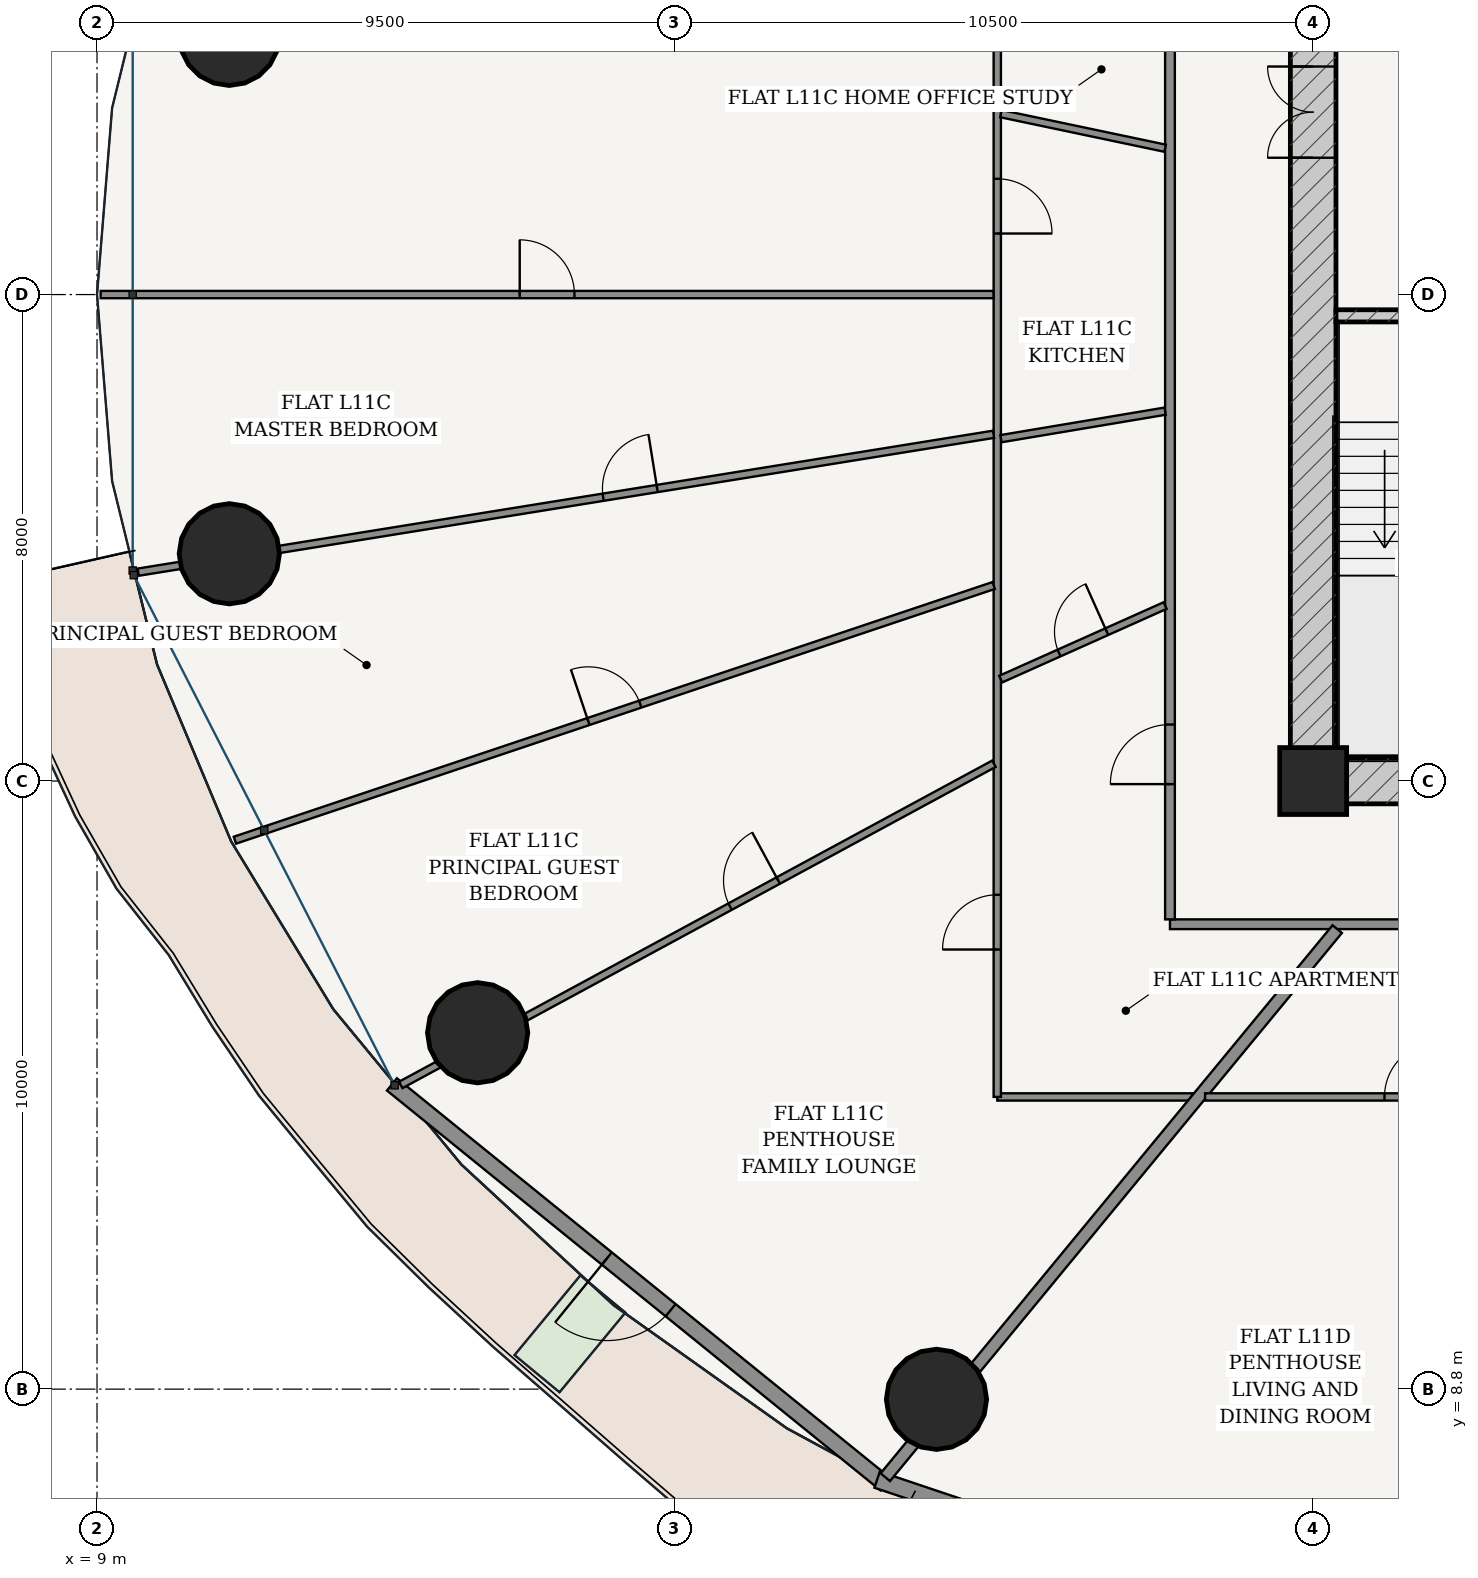
"""IFC4 building model, lengths in metres.
Left out: names, types, materials, properties, quantities, classifications, styles, units other than length and angle.
Written with IfcOpenShell. Run it as: python <this file> out.ifc"""

import sys

from ifc_helpers import new_model, si_unit, direction, frame, frame_2d, origin, origin_2d, place, context, subcontext, project, spatial, rectangle, hollow_circle, extrude, source, transform, mapped, element, fill, save


model = new_model("IFC4")
c1 = context("Model", 3, precision=1e-05, world=origin(), true_north=direction((-0.2419218956, 0.970295726276)))
c2 = subcontext(c1, "Body", "Model", "MODEL_VIEW")
j1 = project(units=[si_unit("LENGTHUNIT", "METRE"), si_unit("PLANEANGLEUNIT", "RADIAN")], contexts=[c1])
p1 = place(None, origin())
s1 = spatial("IfcSite", under=j1, at=p1, CompositionType="ELEMENT")
p2 = place(p1, origin())
s2 = spatial("IfcBuilding", under=s1, at=p2, CompositionType="ELEMENT")
p3 = place(p2, frame((0.0, 0.0, 45.6)))
s3 = spatial("IfcBuildingStorey", under=s2, at=p3, CompositionType="ELEMENT", Elevation=45.6)
p4 = place(p3, frame((29.0, 18.8, 0.0), z_axis=(0.0, 0.0, 1.0), x_axis=(1.0, 0.0, 0.0)))
e1 = element("IfcColumn", 1, at=p4, inside=s3, PredefinedType="COLUMN", context=c2, shape_type="SweptSolid", body=[
    extrude(rectangle(XDim=1.1, YDim=1.1, at=origin_2d()), origin(), (0.0, 0.0, 1.0), 3.6),
])
p5 = place(p3, frame((28.625, 18.8, 0.0), z_axis=(0.0, 0.0, 1.0), x_axis=(1.0, 0.0, 0.0)))
e2 = element("IfcWall", 2, at=p5, inside=s3, PredefinedType="SHEAR", context=c2, shape_type="SweptSolid", body=[
    extrude(rectangle(XDim=18.75, YDim=0.75, at=frame_2d((9.375, 0.0))), origin(), (0.0, 0.0, 1.0), 3.32),
])
p6 = place(p5, frame((7.627, 0.0, 0.0)))
e3 = element("IfcOpeningElement", 3, at=p6, cuts=e2, PredefinedType="OPENING", context=c2, shape_type="SweptSolid", body=[
    extrude(rectangle(XDim=0.85, YDim=2.1, at=frame_2d((0.425, 1.05))), frame((0.0, 0.385, 0.0), z_axis=(0.0, -1.0, 0.0), x_axis=(1.0, 0.0, 0.0)), (0.0, 0.0, 1.0), 0.77),
])
p7 = place(p5, frame((10.673, 0.0, 0.0)))
e4 = element("IfcOpeningElement", 4, at=p7, cuts=e2, PredefinedType="OPENING", context=c2, shape_type="SweptSolid", body=[
    extrude(rectangle(XDim=0.85, YDim=2.1, at=frame_2d((0.425, 1.05))), frame((0.0, 0.385, 0.0), z_axis=(0.0, -1.0, 0.0), x_axis=(1.0, 0.0, 0.0)), (0.0, 0.0, 1.0), 0.77),
])
p8 = place(p3, frame((29.0, 19.175, 0.0), z_axis=(0.0, 0.0, 1.0), x_axis=(0.0, 1.0, 0.0)))
e5 = element("IfcWall", 5, at=p8, inside=s3, PredefinedType="SHEAR", context=c2, shape_type="SweptSolid", body=[
    extrude(rectangle(XDim=15.25, YDim=0.75, at=frame_2d((7.625, 0.0))), origin(), (0.0, 0.0, 1.0), 3.32),
])
p9 = place(p8, frame((9.875, 0.0, 0.0)))
e6 = element("IfcOpeningElement", 6, at=p9, cuts=e5, PredefinedType="OPENING", context=c2, shape_type="SweptSolid", body=[
    extrude(rectangle(XDim=1.5, YDim=2.2, at=frame_2d((0.75, 1.1))), frame((0.0, 0.385, 0.0), z_axis=(0.0, -1.0, 0.0), x_axis=(1.0, 0.0, 0.0)), (0.0, 0.0, 1.0), 0.77),
])
p10 = place(p3, frame((29.375, 26.45, 0.0), z_axis=(0.0, 0.0, 1.0), x_axis=(1.0, 0.0, 0.0)))
e7 = element("IfcWall", 7, at=p10, inside=s3, PredefinedType="SOLIDWALL", context=c2, shape_type="SweptSolid", body=[
    extrude(rectangle(XDim=3.32, YDim=0.2, at=frame_2d((1.66, 0.0))), origin(), (0.0, 0.0, 1.0), 3.32),
])
p11 = place(p10, frame((1.185, 0.0, 0.0)))
e8 = element("IfcOpeningElement", 8, at=p11, cuts=e7, PredefinedType="OPENING", context=c2, shape_type="SweptSolid", body=[
    extrude(rectangle(XDim=0.95, YDim=2.15, at=frame_2d((0.475, 1.075))), frame((0.0, 0.11, 0.0), z_axis=(0.0, -1.0, 0.0), x_axis=(1.0, 0.0, 0.0)), (0.0, 0.0, 1.0), 0.22),
])
for number, where, z_axis, x_axis in (
    (9, (11.176, 31.063, 0.0), (0.0, 0.0, 1.0), (1.0, 0.0, 0.0)),
    (10, (11.176, 22.537, 0.0), (0.0, 0.0, 1.0), (1.0, 0.0, 0.0)),
    (11, (15.259, 14.661, 0.0), (0.0, 0.0, 1.0), (1.0, 0.0, 0.0)),
    (12, (22.805, 8.632, 0.0), (0.0, 0.0, 1.0), (1.0, 0.0, 0.0)),
):
    element("IfcColumn", number, at=place(p3, frame(where, z_axis=z_axis, x_axis=x_axis)), inside=s3, PredefinedType="COLUMN", context=c2, shape_type="SweptSolid", body=[
        extrude(hollow_circle(Radius=0.825, WallThickness=0.05, at=origin_2d()), origin(), (0.0, 0.0, 1.0), 3.6),
    ])
p12 = place(p3, frame((13.85, 13.811, 0.0), z_axis=(0.0, 0.0, 1.0), x_axis=(0.777016782851, -0.629479879875, 0.0)))
e13 = element("IfcWall", 13, at=p12, inside=s3, PredefinedType="SOLIDWALL", context=c2, shape_type="SweptSolid", body=[
    extrude(rectangle(XDim=10.447, YDim=0.26, at=frame_2d((5.223, 0.0))), origin(), (0.0, 0.0, 1.0), 3.32),
])
p13 = place(p12, frame((4.548, 0.0, 0.0)))
e14 = element("IfcOpeningElement", 14, at=p13, cuts=e13, PredefinedType="OPENING", context=c2, shape_type="SweptSolid", body=[
    extrude(rectangle(XDim=1.35, YDim=2.2, at=frame_2d((0.675, 1.1))), frame((0.0, 0.14, 0.0), z_axis=(0.0, -1.0, 0.0), x_axis=(1.0, 0.0, 0.0)), (0.0, 0.0, 1.0), 0.28),
])
p14 = place(p3, frame((21.829, 7.311, 0.0), z_axis=(0.0, 0.0, 1.0), x_axis=(0.948047847546, -0.31812777113, 0.0)))
e15 = element("IfcWall", 15, at=p14, inside=s3, PredefinedType="SOLIDWALL", context=c2, shape_type="SweptSolid", body=[
    extrude(rectangle(XDim=11.175, YDim=0.28, at=frame_2d((5.588, 0.0))), origin(), (0.0, 0.0, 1.0), 3.32),
])
p15 = place(p14, frame((1.967, 0.0, 0.85)))
e16 = element("IfcOpeningElement", 16, at=p15, cuts=e15, PredefinedType="OPENING", context=c2, shape_type="SweptSolid", body=[
    extrude(rectangle(XDim=2.1, YDim=1.95, at=frame_2d((1.05, 0.975))), frame((0.0, 0.15, 0.0), z_axis=(0.0, -1.0, 0.0), x_axis=(1.0, 0.0, 0.0)), (0.0, 0.0, 1.0), 0.3),
])
p16 = place(p14, frame((7.108, 0.0, 0.85)))
e17 = element("IfcOpeningElement", 17, at=p16, cuts=e15, PredefinedType="OPENING", context=c2, shape_type="SweptSolid", body=[
    extrude(rectangle(XDim=2.1, YDim=1.95, at=frame_2d((1.05, 0.975))), frame((0.0, 0.15, 0.0), z_axis=(0.0, -1.0, 0.0), x_axis=(1.0, 0.0, 0.0)), (0.0, 0.0, 1.0), 0.3),
])
p17 = place(p3, frame((26.645, 16.445, 0.0), z_axis=(0.0, 0.0, 1.0), x_axis=(1.0, 0.0, 0.0)))
e18 = element("IfcWall", 18, at=p17, inside=s3, PredefinedType="PARTITIONING", context=c2, shape_type="SweptSolid", body=[
    extrude(rectangle(XDim=22.71, YDim=0.16, at=frame_2d((11.355, 0.0))), origin(), (0.0, 0.0, 1.0), 2.688),
])
p18 = place(p17, frame((19.962, 0.0, 0.0)))
e19 = element("IfcOpeningElement", 19, at=p18, cuts=e18, PredefinedType="OPENING", context=c2, shape_type="SweptSolid", body=[
    extrude(rectangle(XDim=0.98, YDim=2.2, at=frame_2d((0.49, 1.1))), frame((0.0, 0.09, 0.0), z_axis=(0.0, -1.0, 0.0), x_axis=(1.0, 0.0, 0.0)), (0.0, 0.0, 1.0), 0.18),
])
p19 = place(p3, frame((26.645, 16.525, 0.0), z_axis=(0.0, 0.0, 1.0), x_axis=(0.0, 1.0, 0.0)))
e20 = element("IfcWall", 20, at=p19, inside=s3, PredefinedType="PARTITIONING", context=c2, shape_type="SweptSolid", body=[
    extrude(rectangle(XDim=20.55, YDim=0.16, at=frame_2d((10.275, 0.0))), origin(), (0.0, 0.0, 1.0), 2.688),
])
p20 = place(p19, frame((2.224, 0.0, 0.0)))
e21 = element("IfcOpeningElement", 21, at=p20, cuts=e20, PredefinedType="OPENING", context=c2, shape_type="SweptSolid", body=[
    extrude(rectangle(XDim=0.98, YDim=2.2, at=frame_2d((0.49, 1.1))), frame((0.0, 0.09, 0.0), z_axis=(0.0, -1.0, 0.0), x_axis=(1.0, 0.0, 0.0)), (0.0, 0.0, 1.0), 0.18),
])
p21 = place(p3, frame((27.018, 13.605, 0.0), z_axis=(0.0, 0.0, 1.0), x_axis=(-1.0, 0.0, 0.0)))
e22 = element("IfcWall", 22, at=p21, inside=s3, PredefinedType="PARTITIONING", context=c2, shape_type="SweptSolid", body=[
    extrude(rectangle(XDim=3.213, YDim=0.12, at=frame_2d((1.606, 0.0))), origin(), (0.0, 0.0, 1.0), 2.688),
])
p22 = place(p3, frame((23.805, 13.605, 0.0), z_axis=(0.0, 0.0, 1.0), x_axis=(0.0, 1.0, 0.0)))
e23 = element("IfcWall", 23, at=p22, inside=s3, PredefinedType="PARTITIONING", context=c2, shape_type="SweptSolid", body=[
    extrude(rectangle(XDim=20.779, YDim=0.12, at=frame_2d((10.39, 0.0))), origin(), (0.0, 0.0, 1.0), 2.688),
])
p23 = place(p22, frame((2.425, 0.0, 0.0)))
e24 = element("IfcOpeningElement", 24, at=p23, cuts=e23, PredefinedType="OPENING", context=c2, shape_type="SweptSolid", body=[
    extrude(rectangle(XDim=0.9, YDim=2.15, at=frame_2d((0.45, 1.075))), frame((0.0, 0.07, 0.0), z_axis=(0.0, -1.0, 0.0), x_axis=(1.0, 0.0, 0.0)), (0.0, 0.0, 1.0), 0.14),
])
p24 = place(p22, frame((14.199, 0.0, 0.0)))
e25 = element("IfcOpeningElement", 25, at=p24, cuts=e23, PredefinedType="OPENING", context=c2, shape_type="SweptSolid", body=[
    extrude(rectangle(XDim=0.9, YDim=2.15, at=frame_2d((0.45, 1.075))), frame((0.0, 0.07, 0.0), z_axis=(0.0, -1.0, 0.0), x_axis=(1.0, 0.0, 0.0)), (0.0, 0.0, 1.0), 0.14),
])
p25 = place(p22, frame((17.908, 0.0, 0.0)))
e26 = element("IfcOpeningElement", 26, at=p25, cuts=e23, PredefinedType="OPENING", context=c2, shape_type="SweptSolid", body=[
    extrude(rectangle(XDim=0.9, YDim=2.15, at=frame_2d((0.45, 1.075))), frame((0.0, 0.07, 0.0), z_axis=(0.0, -1.0, 0.0), x_axis=(1.0, 0.0, 0.0)), (0.0, 0.0, 1.0), 0.14),
])
p26 = place(p3, frame((23.743, 26.8, 0.0), z_axis=(0.0, 0.0, 1.0), x_axis=(-1.0, 0.0, 0.0)))
e27 = element("IfcWall", 27, at=p26, inside=s3, PredefinedType="PARTITIONING", context=c2, shape_type="SweptSolid", body=[
    extrude(rectangle(XDim=14.683, YDim=0.12, at=frame_2d((7.341, 0.0))), origin(), (0.0, 0.0, 1.0), 2.762),
])
p27 = place(p26, frame((6.892, 0.0, 0.0)))
e28 = element("IfcOpeningElement", 28, at=p27, cuts=e27, PredefinedType="OPENING", context=c2, shape_type="SweptSolid", body=[
    extrude(rectangle(XDim=0.9, YDim=2.15, at=frame_2d((0.45, 1.075))), frame((0.0, 0.07, 0.0), z_axis=(0.0, -1.0, 0.0), x_axis=(1.0, 0.0, 0.0)), (0.0, 0.0, 1.0), 0.14),
])
p28 = place(p3, frame((23.744, 24.502, 0.0), z_axis=(0.0, 0.0, 1.0), x_axis=(-0.987259708938, -0.159117149007, 0.0)))
e29 = element("IfcWall", 29, at=p28, inside=s3, PredefinedType="PARTITIONING", context=c2, shape_type="SweptSolid", body=[
    extrude(rectangle(XDim=14.248, YDim=0.12, at=frame_2d((7.124, 0.0))), origin(), (0.0, 0.0, 1.0), 2.688),
])
p29 = place(p28, frame((5.603, 0.0, 0.0)))
e30 = element("IfcOpeningElement", 30, at=p29, cuts=e29, PredefinedType="OPENING", context=c2, shape_type="SweptSolid", body=[
    extrude(rectangle(XDim=0.9, YDim=2.15, at=frame_2d((0.45, 1.075))), frame((0.0, 0.07, 0.0), z_axis=(0.0, -1.0, 0.0), x_axis=(1.0, 0.0, 0.0)), (0.0, 0.0, 1.0), 0.14),
])
p30 = place(p3, frame((23.746, 22.016, 0.0), z_axis=(0.0, 0.0, 1.0), x_axis=(-0.948022802246, -0.318202398516, 0.0)))
e31 = element("IfcWall", 31, at=p30, inside=s3, PredefinedType="PARTITIONING", context=c2, shape_type="SweptSolid", body=[
    extrude(rectangle(XDim=13.163, YDim=0.12, at=frame_2d((6.582, 0.0))), origin(), (0.0, 0.0, 1.0), 2.762),
])
p31 = place(p30, frame((6.131, 0.0, 0.0)))
e32 = element("IfcOpeningElement", 32, at=p31, cuts=e31, PredefinedType="OPENING", context=c2, shape_type="SweptSolid", body=[
    extrude(rectangle(XDim=0.9, YDim=2.15, at=frame_2d((0.45, 1.075))), frame((0.0, 0.07, 0.0), z_axis=(0.0, -1.0, 0.0), x_axis=(1.0, 0.0, 0.0)), (0.0, 0.0, 1.0), 0.14),
])
p32 = place(p3, frame((23.75, 19.084, 0.0), z_axis=(0.0, 0.0, 1.0), x_axis=(-0.879370672984, -0.476137815654, 0.0)))
e33 = element("IfcWall", 33, at=p32, inside=s3, PredefinedType="PARTITIONING", context=c2, shape_type="SweptSolid", body=[
    extrude(rectangle(XDim=11.094, YDim=0.12, at=frame_2d((5.547, 0.0))), origin(), (0.0, 0.0, 1.0), 2.688),
])
p33 = place(p32, frame((4.034, 0.0, 0.0)))
e34 = element("IfcOpeningElement", 34, at=p33, cuts=e33, PredefinedType="OPENING", context=c2, shape_type="SweptSolid", body=[
    extrude(rectangle(XDim=0.9, YDim=2.15, at=frame_2d((0.45, 1.075))), frame((0.0, 0.07, 0.0), z_axis=(0.0, -1.0, 0.0), x_axis=(1.0, 0.0, 0.0)), (0.0, 0.0, 1.0), 0.14),
])
p34 = place(p3, frame((26.565, 29.207, 0.0), z_axis=(0.0, 0.0, 1.0), x_axis=(-0.978560113768, 0.205961413236, 0.0)))
e35 = element("IfcWall", 35, at=p34, inside=s3, PredefinedType="PARTITIONING", context=c2, shape_type="SweptSolid", body=[
    extrude(rectangle(XDim=2.758, YDim=0.12, at=frame_2d((1.379, 0.0))), origin(), (0.0, 0.0, 1.0), 3.32),
])
p35 = place(p3, frame((26.565, 24.883, 0.0), z_axis=(0.0, 0.0, 1.0), x_axis=(-0.986224611599, -0.165411654596, 0.0)))
e36 = element("IfcWall", 36, at=p35, inside=s3, PredefinedType="PARTITIONING", context=c2, shape_type="SweptSolid", body=[
    extrude(rectangle(XDim=2.736, YDim=0.12, at=frame_2d((1.368, 0.0))), origin(), (0.0, 0.0, 1.0), 2.688),
])
p36 = place(p3, frame((26.565, 21.685, 0.0), z_axis=(0.0, 0.0, 1.0), x_axis=(-0.912840085104, -0.408317252914, 0.0)))
e37 = element("IfcWall", 37, at=p36, inside=s3, PredefinedType="PARTITIONING", context=c2, shape_type="SweptSolid", body=[
    extrude(rectangle(XDim=2.961, YDim=0.12, at=frame_2d((1.481, 0.0))), origin(), (0.0, 0.0, 1.0), 3.32),
])
p37 = place(p36, frame((1.051, 0.0, 0.0)))
e38 = element("IfcOpeningElement", 38, at=p37, cuts=e37, PredefinedType="OPENING", context=c2, shape_type="SweptSolid", body=[
    extrude(rectangle(XDim=0.86, YDim=2.15, at=frame_2d((0.43, 1.075))), frame((0.0, 0.07, 0.0), z_axis=(0.0, -1.0, 0.0), x_axis=(1.0, 0.0, 0.0)), (0.0, 0.0, 1.0), 0.14),
])
p38 = place(p3, frame((29.396, 16.365, 0.0), z_axis=(0.0, 0.0, 1.0), x_axis=(-0.636186165667, -0.771535587393, 0.0)))
e39 = element("IfcWall", 39, at=p38, inside=s3, PredefinedType="PARTITIONING", context=c2, shape_type="SweptSolid", body=[
    extrude(rectangle(XDim=11.683, YDim=0.2, at=frame_2d((5.842, 0.0))), origin(), (0.0, 0.0, 1.0), 2.688),
])
p39 = place(p3, frame((52.195, 13.605, 0.0), z_axis=(0.0, 0.0, 1.0), x_axis=(-1.0, 0.0, 0.0)))
e40 = element("IfcWall", 40, at=p39, inside=s3, PredefinedType="PARTITIONING", context=c2, shape_type="SweptSolid", body=[
    extrude(rectangle(XDim=24.973, YDim=0.12, at=frame_2d((12.487, 0.0))), origin(), (0.0, 0.0, 1.0), 2.688),
])
p40 = place(p39, frame((3.841, 0.0, 0.0)))
e41 = element("IfcOpeningElement", 41, at=p40, cuts=e40, PredefinedType="OPENING", context=c2, shape_type="SweptSolid", body=[
    extrude(rectangle(XDim=0.9, YDim=2.15, at=frame_2d((0.45, 1.075))), frame((0.0, 0.07, 0.0), z_axis=(0.0, -1.0, 0.0), x_axis=(1.0, 0.0, 0.0)), (0.0, 0.0, 1.0), 0.14),
])
p41 = place(p39, frame((15.819, 0.0, 0.0)))
e42 = element("IfcOpeningElement", 42, at=p41, cuts=e40, PredefinedType="OPENING", context=c2, shape_type="SweptSolid", body=[
    extrude(rectangle(XDim=0.9, YDim=2.15, at=frame_2d((0.45, 1.075))), frame((0.0, 0.07, 0.0), z_axis=(0.0, -1.0, 0.0), x_axis=(1.0, 0.0, 0.0)), (0.0, 0.0, 1.0), 0.14),
])
p42 = place(p39, frame((21.123, 0.0, 0.0)))
e43 = element("IfcOpeningElement", 43, at=p42, cuts=e40, PredefinedType="OPENING", context=c2, shape_type="SweptSolid", body=[
    extrude(rectangle(XDim=0.9, YDim=2.15, at=frame_2d((0.45, 1.075))), frame((0.0, 0.07, 0.0), z_axis=(0.0, -1.0, 0.0), x_axis=(1.0, 0.0, 0.0)), (0.0, 0.0, 1.0), 0.14),
])
m1 = source(origin(), c2, "Body", "SweptSolid", [
    extrude(rectangle(XDim=1.35, YDim=2.2, at=frame_2d((0.675, 1.1))), frame((0.0, 0.025, 0.0), z_axis=(0.0, -1.0, 0.0), x_axis=(1.0, 0.0, 0.0)), (0.0, 0.0, 1.0), 0.05),
])
p43 = place(p13, frame((1.35, 0.0, 0.0), z_axis=(0.0, 0.0, 1.0), x_axis=(-1.0, 0.0, 0.0)))
e44 = element("IfcDoor", 44, at=p43, inside=s3, OperationType="SINGLE_SWING_RIGHT", PredefinedType="DOOR", context=c2, shape_type="MappedRepresentation", body=[
    mapped(m1, transform((0.0, 0.0, 0.0), scale=1.0)),
])
fill(e14, e44)
m2 = source(origin(), c2, "Body", "SweptSolid", [
    extrude(rectangle(XDim=1.5, YDim=2.2, at=frame_2d((0.75, 1.1))), frame((0.0, 0.025, 0.0), z_axis=(0.0, -1.0, 0.0), x_axis=(1.0, 0.0, 0.0)), (0.0, 0.0, 1.0), 0.05),
])
p44 = place(p9, origin())
e45 = element("IfcDoor", 45, at=p44, inside=s3, OperationType="DOUBLE_DOOR_SINGLE_SWING", PredefinedType="DOOR", context=c2, shape_type="MappedRepresentation", body=[
    mapped(m2, transform((0.0, 0.0, 0.0), scale=1.0)),
])
fill(e6, e45)
m3 = source(origin(), c2, "Body", "SweptSolid", [
    extrude(rectangle(XDim=0.98, YDim=2.2, at=frame_2d((0.49, 1.1))), frame((0.0, 0.025, 0.0), z_axis=(0.0, -1.0, 0.0), x_axis=(1.0, 0.0, 0.0)), (0.0, 0.0, 1.0), 0.05),
])
p45 = place(p20, origin())
e46 = element("IfcDoor", 46, at=p45, inside=s3, OperationType="SINGLE_SWING_LEFT", PredefinedType="DOOR", context=c2, shape_type="MappedRepresentation", body=[
    mapped(m3, transform((0.0, 0.0, 0.0), scale=1.0)),
])
fill(e21, e46)
m4 = source(origin(), c2, "Body", "SweptSolid", [
    extrude(rectangle(XDim=0.86, YDim=2.15, at=frame_2d((0.43, 1.075))), frame((0.0, 0.025, 0.0), z_axis=(0.0, -1.0, 0.0), x_axis=(1.0, 0.0, 0.0)), (0.0, 0.0, 1.0), 0.05),
])
p46 = place(p37, frame((0.86, 0.0, 0.0), z_axis=(0.0, 0.0, 1.0), x_axis=(-1.0, 0.0, 0.0)))
e47 = element("IfcDoor", 47, at=p46, inside=s3, OperationType="SINGLE_SWING_RIGHT", PredefinedType="DOOR", context=c2, shape_type="MappedRepresentation", body=[
    mapped(m4, transform((0.0, 0.0, 0.0), scale=1.0)),
])
fill(e38, e47)
m5 = source(origin(), c2, "Body", "SweptSolid", [
    extrude(rectangle(XDim=0.9, YDim=2.15, at=frame_2d((0.45, 1.075))), frame((0.0, 0.025, 0.0), z_axis=(0.0, -1.0, 0.0), x_axis=(1.0, 0.0, 0.0)), (0.0, 0.0, 1.0), 0.05),
])
p47 = place(p23, origin())
e48 = element("IfcDoor", 48, at=p47, inside=s3, OperationType="SINGLE_SWING_LEFT", PredefinedType="DOOR", context=c2, shape_type="MappedRepresentation", body=[
    mapped(m5, transform((0.0, 0.0, 0.0), scale=1.0)),
])
fill(e24, e48)
p48 = place(p33, frame((0.9, 0.0, 0.0), z_axis=(0.0, 0.0, 1.0), x_axis=(-1.0, 0.0, 0.0)))
e49 = element("IfcDoor", 49, at=p48, inside=s3, OperationType="SINGLE_SWING_RIGHT", PredefinedType="DOOR", context=c2, shape_type="MappedRepresentation", body=[
    mapped(m5, transform((0.0, 0.0, 0.0), scale=1.0)),
])
fill(e34, e49)
p49 = place(p31, frame((0.9, 0.0, 0.0), z_axis=(0.0, 0.0, 1.0), x_axis=(-1.0, 0.0, 0.0)))
e50 = element("IfcDoor", 50, at=p49, inside=s3, OperationType="SINGLE_SWING_LEFT", PredefinedType="DOOR", context=c2, shape_type="MappedRepresentation", body=[
    mapped(m5, transform((0.0, 0.0, 0.0), scale=1.0)),
])
fill(e32, e50)
p50 = place(p29, frame((0.9, 0.0, 0.0), z_axis=(0.0, 0.0, 1.0), x_axis=(-1.0, 0.0, 0.0)))
e51 = element("IfcDoor", 51, at=p50, inside=s3, OperationType="SINGLE_SWING_RIGHT", PredefinedType="DOOR", context=c2, shape_type="MappedRepresentation", body=[
    mapped(m5, transform((0.0, 0.0, 0.0), scale=1.0)),
])
fill(e30, e51)
p51 = place(p27, frame((0.9, 0.0, 0.0), z_axis=(0.0, 0.0, 1.0), x_axis=(-1.0, 0.0, 0.0)))
e52 = element("IfcDoor", 52, at=p51, inside=s3, OperationType="SINGLE_SWING_LEFT", PredefinedType="DOOR", context=c2, shape_type="MappedRepresentation", body=[
    mapped(m5, transform((0.0, 0.0, 0.0), scale=1.0)),
])
fill(e28, e52)
p52 = place(p24, frame((0.9, 0.0, 0.0), z_axis=(0.0, 0.0, 1.0), x_axis=(-1.0, 0.0, 0.0)))
e53 = element("IfcDoor", 53, at=p52, inside=s3, OperationType="SINGLE_SWING_RIGHT", PredefinedType="DOOR", context=c2, shape_type="MappedRepresentation", body=[
    mapped(m5, transform((0.0, 0.0, 0.0), scale=1.0)),
])
fill(e25, e53)
p53 = place(p42, frame((0.9, 0.0, 0.0), z_axis=(0.0, 0.0, 1.0), x_axis=(-1.0, 0.0, 0.0)))
e54 = element("IfcDoor", 54, at=p53, inside=s3, OperationType="SINGLE_SWING_RIGHT", PredefinedType="DOOR", context=c2, shape_type="MappedRepresentation", body=[
    mapped(m5, transform((0.0, 0.0, 0.0), scale=1.0)),
])
fill(e43, e54)
save(model, sys.argv[1])
